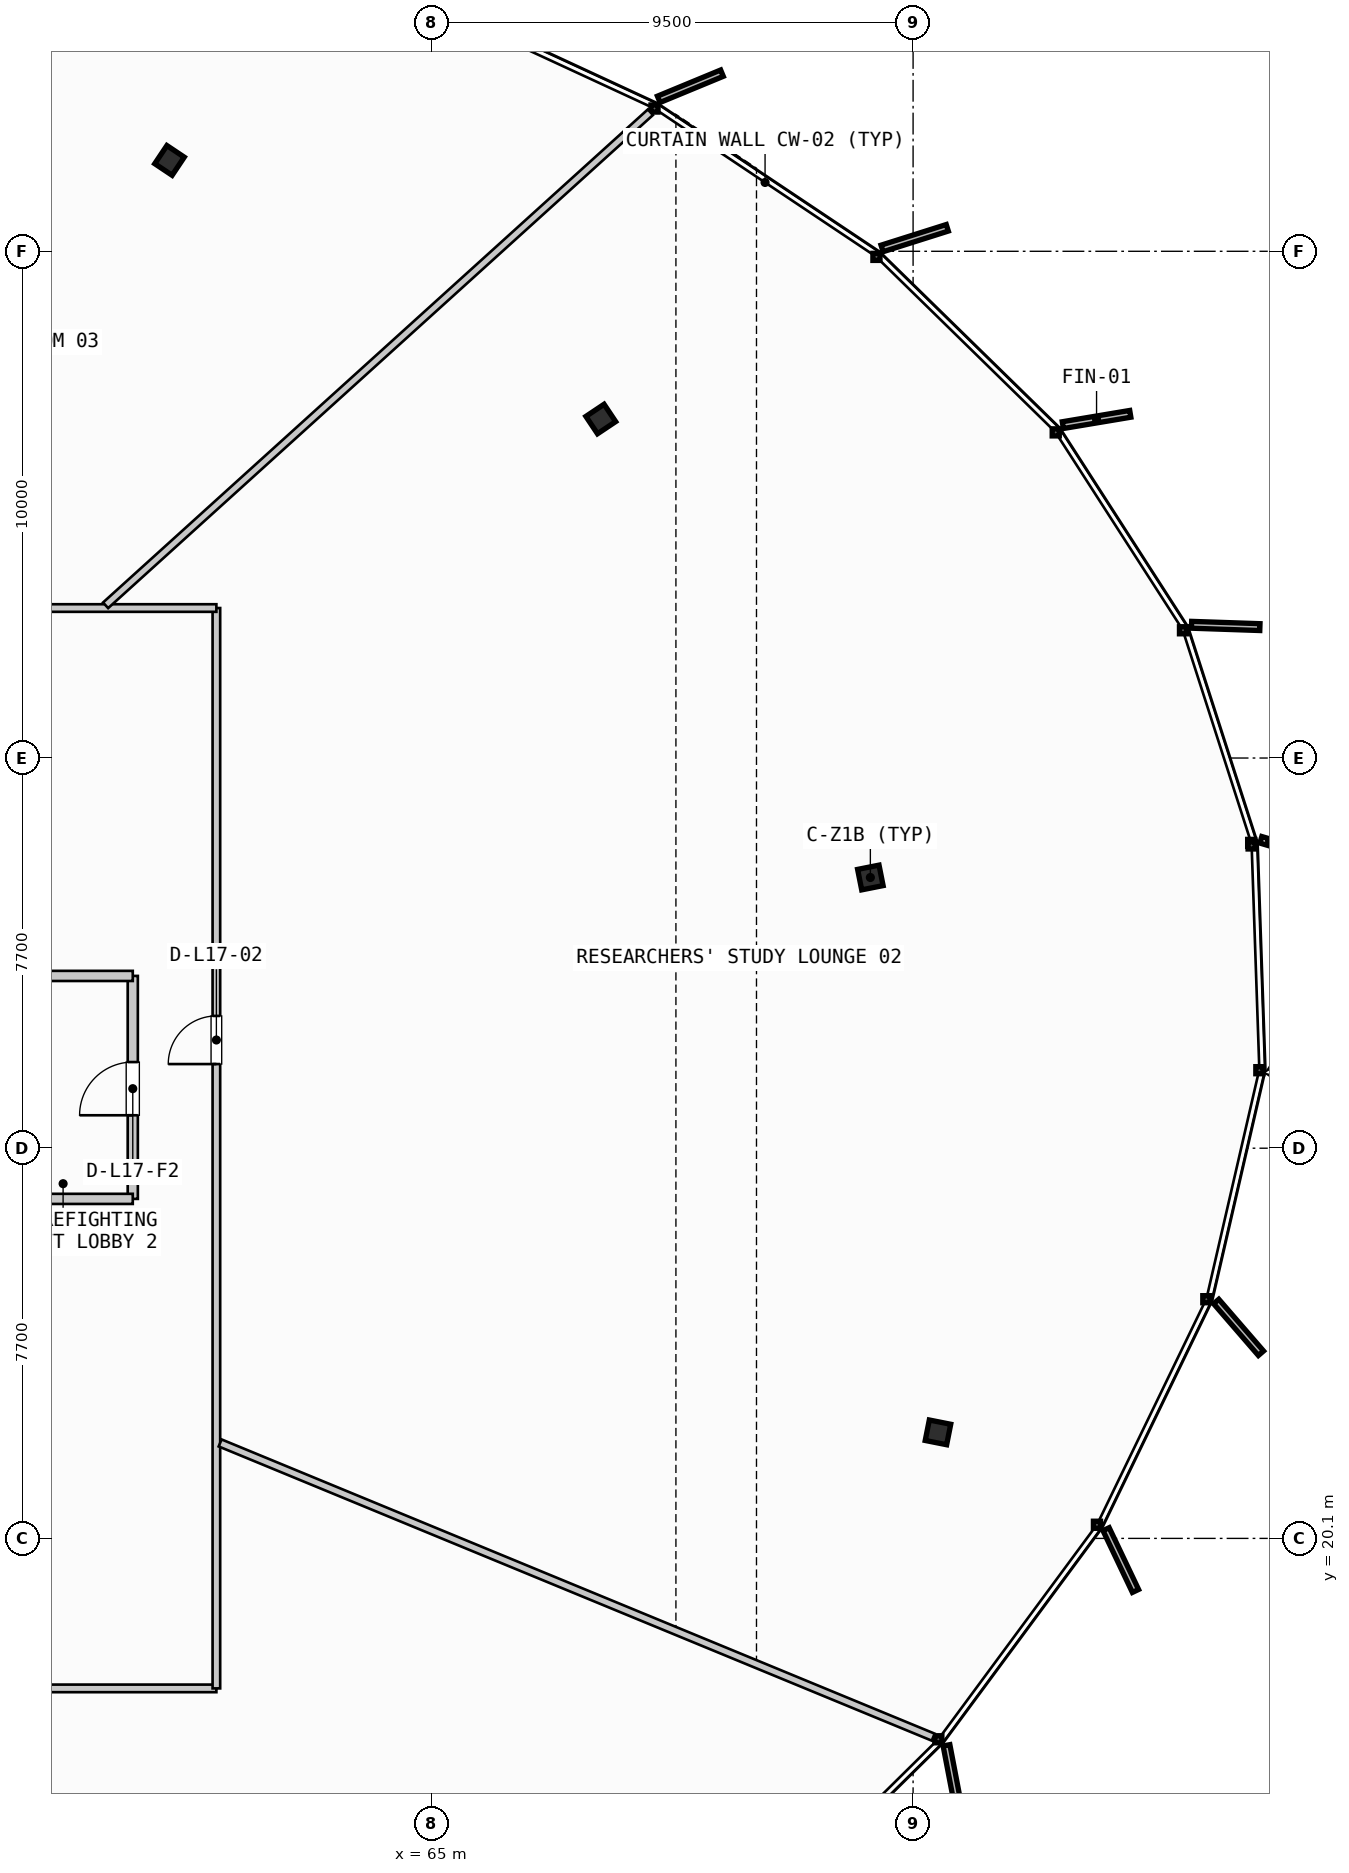
"""IFC4 building model, lengths in metres.
Left out: names, types, materials, properties, quantities, classifications, styles, units other than length and angle.
Written with IfcOpenShell. Run it as: python <this file> out.ifc"""

import sys

from ifc_helpers import new_model, si_unit, direction, frame, frame_2d, origin, origin_2d, place, context, subcontext, project, spatial, rectangle, i_section, extrude, source, transform, mapped, element, fill, save


model = new_model("IFC4")
c1 = context("Model", 3, precision=1e-05, world=origin(), true_north=direction((0.0, 1.0)))
c2 = subcontext(c1, "Body", "Model", "MODEL_VIEW")
j1 = project(units=[si_unit("LENGTHUNIT", "METRE"), si_unit("PLANEANGLEUNIT", "RADIAN")], contexts=[c1])
p1 = place(None, origin())
s1 = spatial("IfcSite", under=j1, at=p1, CompositionType="ELEMENT")
p2 = place(p1, origin())
s2 = spatial("IfcBuilding", under=s1, at=p2, CompositionType="ELEMENT")
p3 = place(p2, frame((0.0, 0.0, 71.4)))
s3 = spatial("IfcBuildingStorey", under=s2, at=p3, CompositionType="ELEMENT", Elevation=71.4)
m1 = source(origin(), c2, "Body", "SweptSolid", [
    extrude(i_section(OverallWidth=0.412, OverallDepth=0.431, WebThickness=0.042, FlangeThickness=0.068, FilletRadius=0.015, at=origin_2d()), origin(), (0.0, 0.0, 1.0), 3.54),
])
for number, where, z_axis, x_axis in (
    (1, (73.657, 33.142, 0.0), (0.0, 0.0, 1.0), (0.981, 0.195, 0.0)),
    (2, (68.336, 42.19, 0.0), (0.0, 0.0, 1.0), (0.831, 0.556, 0.0)),
    (3, (59.825, 47.293, 0.0), (0.0, 0.0, 1.0), (0.556, 0.831, 0.0)),
    (4, (74.991, 22.192, 0.0), (0.0, 0.0, 1.0), (0.981, -0.195, 0.0)),
):
    element("IfcColumn", number, at=place(p3, frame(where, z_axis=z_axis, x_axis=x_axis)), inside=s3, PredefinedType="COLUMN", context=c2, shape_type="MappedRepresentation", body=[
        mapped(m1, transform((0.0, 0.0, 0.0), scale=1.0)),
    ])
p4 = place(p3, frame((59.1, 26.8, 0.0), z_axis=(0.0, 0.0, 1.0), x_axis=(0.0, 1.0, 0.0)))
e5 = element("IfcWall", 5, at=p4, inside=s3, PredefinedType="PARTITIONING", context=c2, shape_type="SweptSolid", body=[
    extrude(rectangle(XDim=4.4, YDim=0.2, at=frame_2d((2.2, 0.0))), origin(), (0.0, 0.0, 1.0), 2.495),
])
p5 = place(p4, frame((1.65, 0.0, 0.0)))
e6 = element("IfcOpeningElement", 6, at=p5, cuts=e5, PredefinedType="OPENING", context=c2, shape_type="SweptSolid", body=[
    extrude(rectangle(XDim=1.05, YDim=2.15, at=frame_2d((0.525, 1.075))), frame((0.0, 0.11, 0.0), z_axis=(0.0, -1.0, 0.0), x_axis=(1.0, 0.0, 0.0)), (0.0, 0.0, 1.0), 0.22),
])
for number, where, z_axis, x_axis in (
    (7, (55.96, 26.8, 0.0), (0.0, 0.0, 1.0), (1.0, 0.0, 0.0)),
    (8, (55.96, 31.2, 0.0), (0.0, 0.0, 1.0), (1.0, 0.0, 0.0)),
):
    element("IfcWall", number, at=place(p3, frame(where, z_axis=z_axis, x_axis=x_axis)), inside=s3, PredefinedType="PARTITIONING", context=c2, shape_type="SweptSolid", body=[
        extrude(rectangle(XDim=3.14, YDim=0.2, at=frame_2d((1.57, 0.0))), origin(), (0.0, 0.0, 1.0), 2.495),
    ])
p6 = place(p3, frame((31.29, 17.14, 0.0), z_axis=(0.0, 0.0, 1.0), x_axis=(1.0, 0.0, 0.0)))
e9 = element("IfcWall", 9, at=p6, inside=s3, PredefinedType="PARTITIONING", context=c2, shape_type="SweptSolid", body=[
    extrude(rectangle(XDim=29.46, YDim=0.15, at=frame_2d((14.73, 0.0))), origin(), (0.0, 0.0, 1.0), 2.495),
])
p7 = place(p6, frame((14.255, 0.0, 0.0)))
e10 = element("IfcOpeningElement", 10, at=p7, cuts=e9, PredefinedType="OPENING", context=c2, shape_type="SweptSolid", body=[
    extrude(rectangle(XDim=0.95, YDim=2.15, at=frame_2d((0.475, 1.075))), frame((0.0, 0.085, 0.0), z_axis=(0.0, -1.0, 0.0), x_axis=(1.0, 0.0, 0.0)), (0.0, 0.0, 1.0), 0.17),
])
p8 = place(p3, frame((60.75, 17.14, 0.0), z_axis=(0.0, 0.0, 1.0), x_axis=(0.0, 1.0, 0.0)))
e11 = element("IfcWall", 11, at=p8, inside=s3, PredefinedType="PARTITIONING", context=c2, shape_type="SweptSolid", body=[
    extrude(rectangle(XDim=21.32, YDim=0.15, at=frame_2d((10.66, 0.0))), origin(), (0.0, 0.0, 1.0), 2.495),
])
p9 = place(p8, frame((12.321, 0.0, 0.0)))
e12 = element("IfcOpeningElement", 12, at=p9, cuts=e11, PredefinedType="OPENING", context=c2, shape_type="SweptSolid", body=[
    extrude(rectangle(XDim=0.95, YDim=2.15, at=frame_2d((0.475, 1.075))), frame((0.0, 0.085, 0.0), z_axis=(0.0, -1.0, 0.0), x_axis=(1.0, 0.0, 0.0)), (0.0, 0.0, 1.0), 0.17),
])
p10 = place(p3, frame((60.75, 38.46, 0.0), z_axis=(0.0, 0.0, 1.0), x_axis=(-1.0, 0.0, 0.0)))
e13 = element("IfcWall", 13, at=p10, inside=s3, PredefinedType="PARTITIONING", context=c2, shape_type="SweptSolid", body=[
    extrude(rectangle(XDim=29.46, YDim=0.15, at=frame_2d((14.73, 0.0))), origin(), (0.0, 0.0, 1.0), 2.495),
])
p11 = place(p10, frame((7.337, 0.0, 0.0)))
e14 = element("IfcOpeningElement", 14, at=p11, cuts=e13, PredefinedType="OPENING", context=c2, shape_type="SweptSolid", body=[
    extrude(rectangle(XDim=0.95, YDim=2.15, at=frame_2d((0.475, 1.075))), frame((0.0, 0.085, 0.0), z_axis=(0.0, -1.0, 0.0), x_axis=(1.0, 0.0, 0.0)), (0.0, 0.0, 1.0), 0.17),
])
p12 = place(p10, frame((20.722, 0.0, 0.0)))
e15 = element("IfcOpeningElement", 15, at=p12, cuts=e13, PredefinedType="OPENING", context=c2, shape_type="SweptSolid", body=[
    extrude(rectangle(XDim=0.95, YDim=2.15, at=frame_2d((0.475, 1.075))), frame((0.0, 0.085, 0.0), z_axis=(0.0, -1.0, 0.0), x_axis=(1.0, 0.0, 0.0)), (0.0, 0.0, 1.0), 0.17),
])
p13 = place(p3, frame((60.824, 21.984, 0.0), z_axis=(0.0, 0.0, 1.0), x_axis=(0.924417823498, -0.381381289001, 0.0)))
e16 = element("IfcWall", 16, at=p13, inside=s3, PredefinedType="PARTITIONING", context=c2, shape_type="SweptSolid", body=[
    extrude(rectangle(XDim=15.223, YDim=0.15, at=frame_2d((7.612, 0.0))), origin(), (0.0, 0.0, 1.0), 2.495),
])
p14 = place(p3, frame((58.564, 38.514, 0.0), z_axis=(0.0, 0.0, 1.0), x_axis=(0.741451212239, 0.671006780793, 0.0)))
e17 = element("IfcWall", 17, at=p14, inside=s3, PredefinedType="PARTITIONING", context=c2, shape_type="SweptSolid", body=[
    extrude(rectangle(XDim=14.5, YDim=0.15, at=frame_2d((7.25, 0.0))), origin(), (0.0, 0.0, 1.0), 2.495),
])
m2 = source(origin(), c2, "Body", "SweptSolid", [
    extrude(rectangle(XDim=1.05, YDim=2.15, at=frame_2d((0.525, 1.075))), frame((0.0, 0.025, 0.0), z_axis=(0.0, -1.0, 0.0), x_axis=(1.0, 0.0, 0.0)), (0.0, 0.0, 1.0), 0.05),
])
p15 = place(p5, origin())
e18 = element("IfcDoor", 18, at=p15, inside=s3, OperationType="SINGLE_SWING_LEFT", PredefinedType="DOOR", context=c2, shape_type="MappedRepresentation", body=[
    mapped(m2, transform((0.0, 0.0, 0.0), scale=1.0)),
])
fill(e6, e18)
m3 = source(origin(), c2, "Body", "SweptSolid", [
    extrude(rectangle(XDim=0.95, YDim=2.15, at=frame_2d((0.475, 1.075))), frame((0.0, 0.025, 0.0), z_axis=(0.0, -1.0, 0.0), x_axis=(1.0, 0.0, 0.0)), (0.0, 0.0, 1.0), 0.05),
])
p16 = place(p9, origin())
e19 = element("IfcDoor", 19, at=p16, inside=s3, OperationType="SINGLE_SWING_LEFT", PredefinedType="DOOR", context=c2, shape_type="MappedRepresentation", body=[
    mapped(m3, transform((0.0, 0.0, 0.0), scale=1.0)),
])
fill(e12, e19)
save(model, sys.argv[1])
